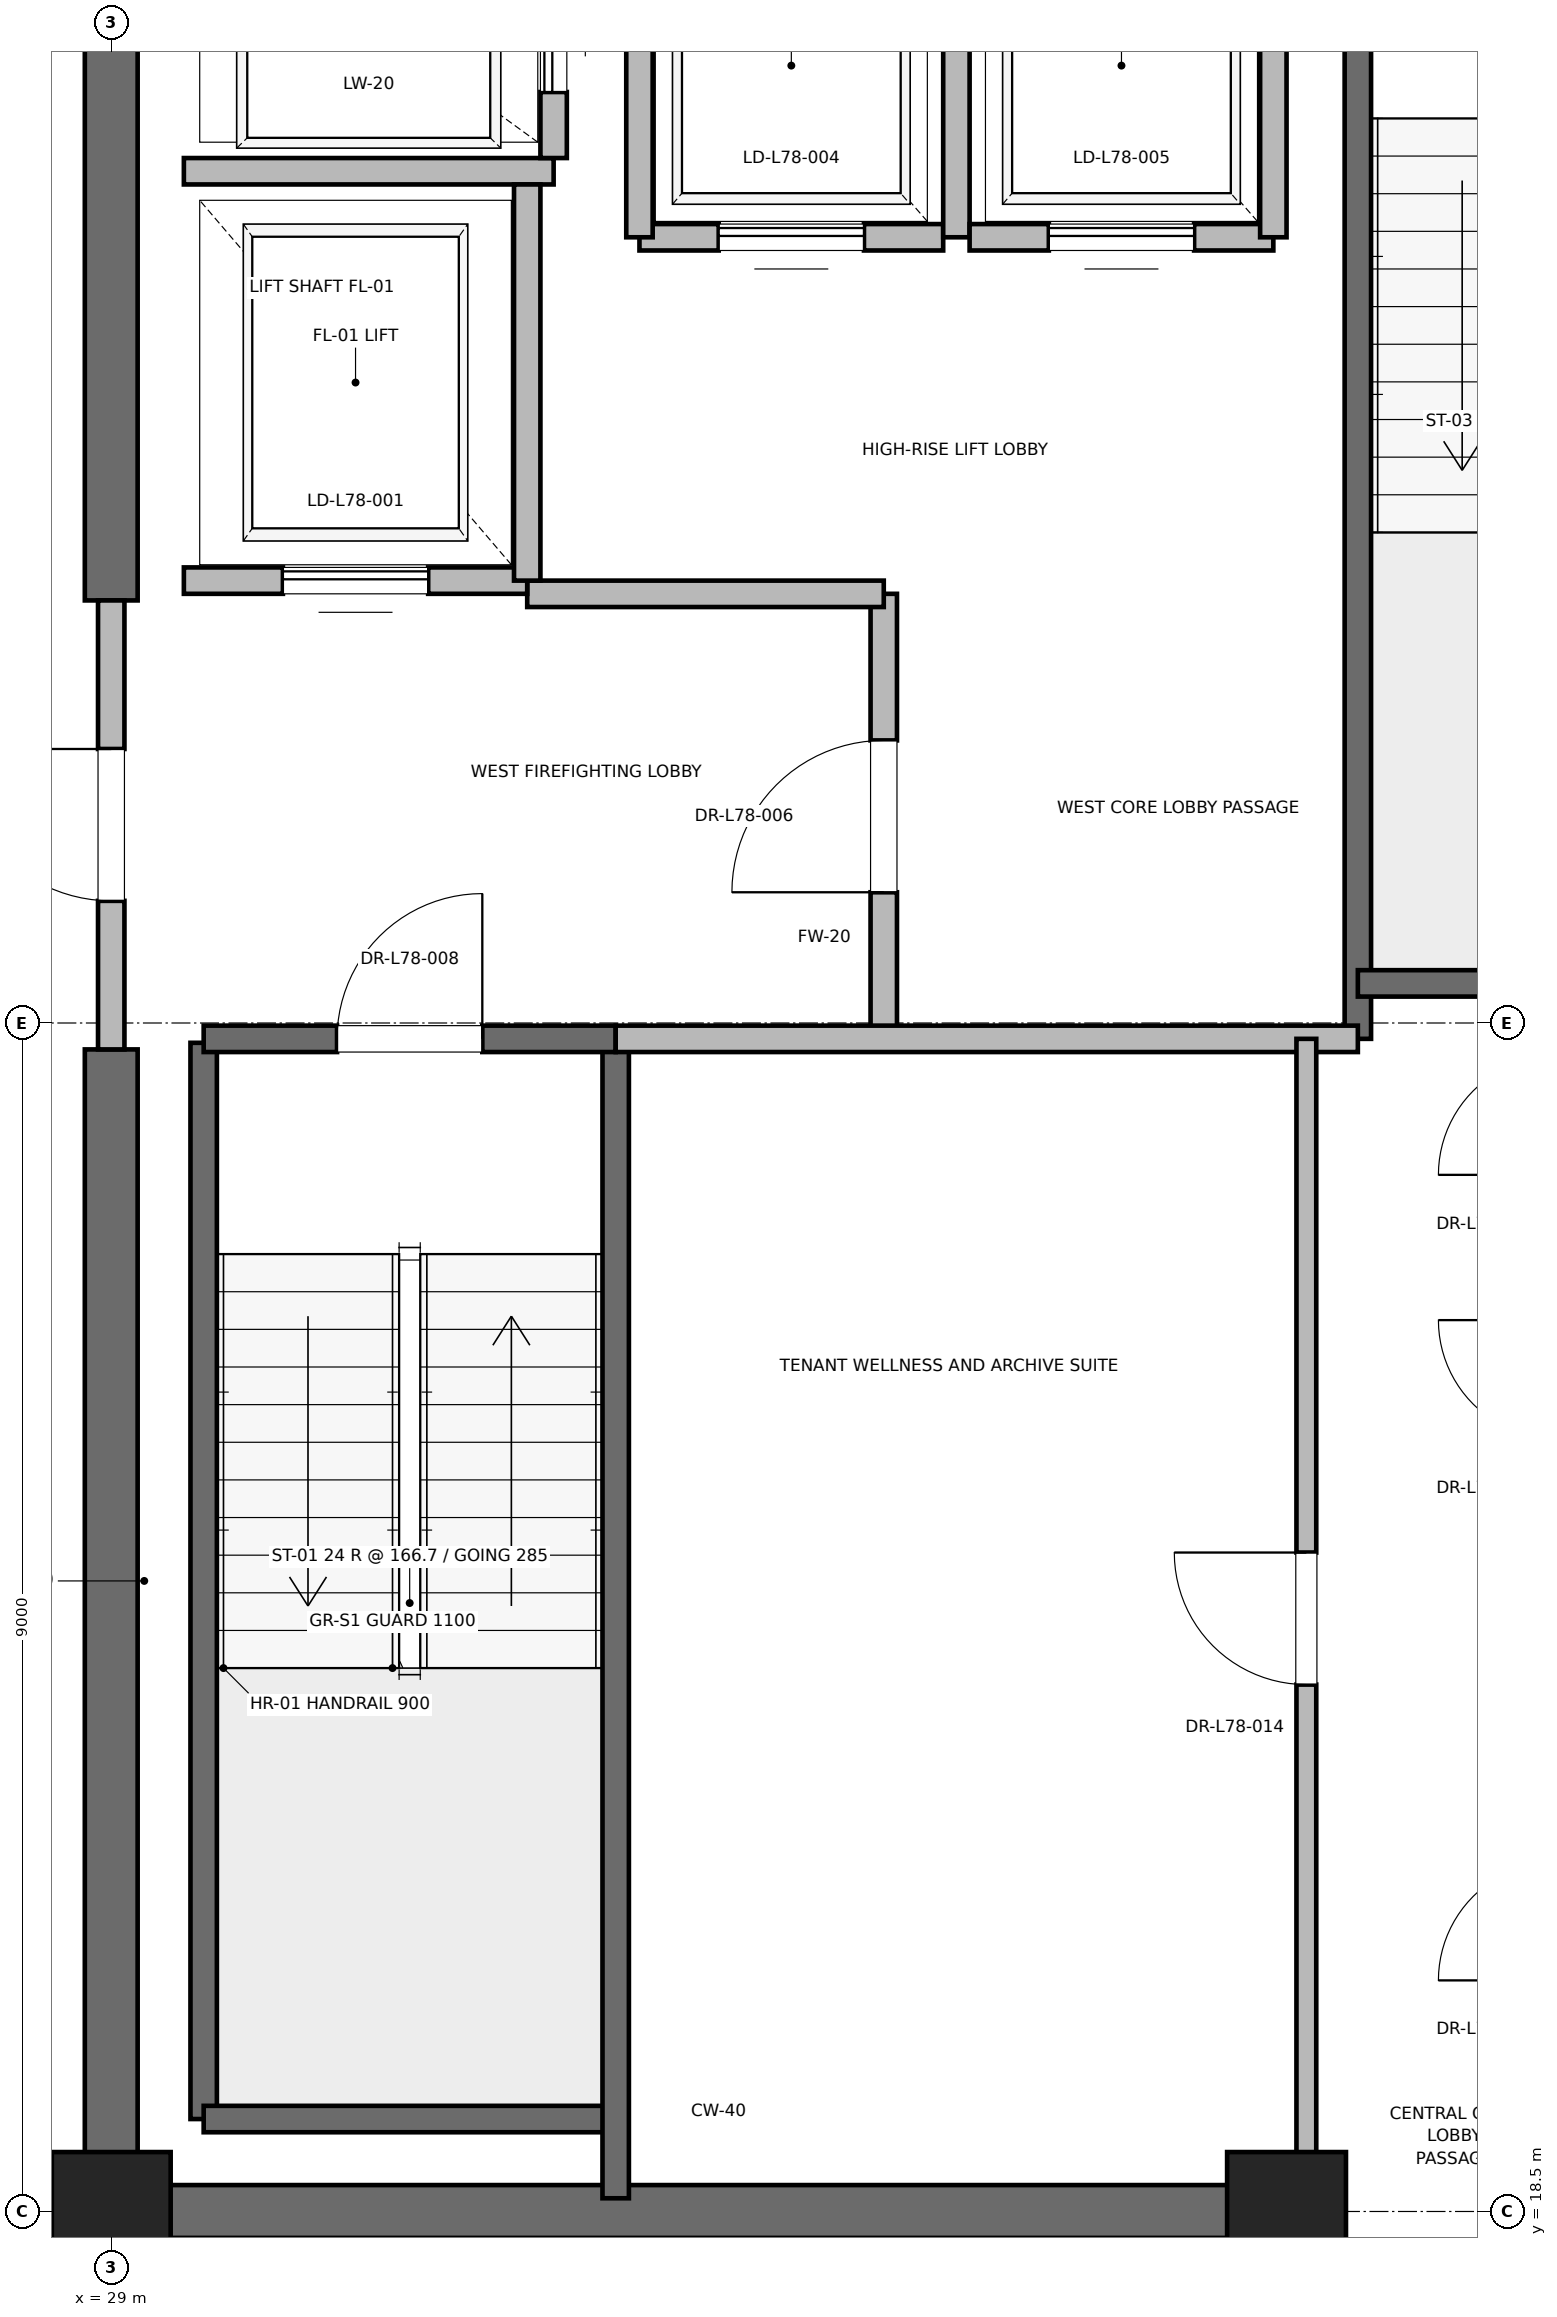
"""IFC4 building model, lengths in metres.
Left out: names, types, materials, properties, quantities, classifications, styles, units other than length and angle.
Written with IfcOpenShell. Run it as: python <this file> out.ifc"""

import sys

from ifc_helpers import new_model, si_unit, direction, frame, frame_2d, origin, origin_2d, place, context, subcontext, project, spatial, rectangle, extrude, element, fill, save


model = new_model("IFC4")
c1 = context("Model", 3, precision=1e-05, world=origin(), true_north=direction((0.0, 1.0)))
c2 = subcontext(c1, "Body", "Model", "MODEL_VIEW")
j1 = project(units=[si_unit("LENGTHUNIT", "METRE"), si_unit("PLANEANGLEUNIT", "RADIAN")], contexts=[c1])
p1 = place(None, origin())
s1 = spatial("IfcSite", under=j1, at=p1, CompositionType="ELEMENT")
p2 = place(p1, origin())
s2 = spatial("IfcBuilding", under=s1, at=p2, CompositionType="ELEMENT")
p3 = place(p2, frame((0.0, 0.0, 334.8)))
s3 = spatial("IfcBuildingStorey", under=s2, at=p3, CompositionType="ELEMENT", Elevation=334.8)
for number, where, z_axis, x_axis in (
    (1, (29.0, 18.5, 0.0), (0.0, 0.0, 1.0), (1.0, 0.0, 0.0)),
    (2, (37.9, 18.5, 0.0), (0.0, 0.0, 1.0), (1.0, 0.0, 0.0)),
):
    element("IfcColumn", number, at=place(p3, frame(where, z_axis=z_axis, x_axis=x_axis)), inside=s3, PredefinedType="PILASTER", context=c2, shape_type="SweptSolid", body=[
        extrude(rectangle(XDim=0.9, YDim=0.9, at=origin_2d()), origin(), (0.0, 0.0, 1.0), 4.0),
    ])
p4 = place(p3, frame((29.0, 18.5, 0.0), z_axis=(0.0, 0.0, 1.0), x_axis=(1.0, 0.0, 0.0)))
e3 = element("IfcWall", 3, at=p4, inside=s3, PredefinedType="SHEAR", context=c2, shape_type="SweptSolid", body=[
    extrude(rectangle(XDim=9.2, YDim=0.4, at=frame_2d((4.6, 0.0))), origin(), (0.0, 0.0, 1.0), 3.785),
])
p5 = place(p3, frame((29.0, 18.5, 0.0), z_axis=(0.0, 0.0, 1.0), x_axis=(0.0, 1.0, 0.0)))
e4 = element("IfcWall", 4, at=p5, inside=s3, PredefinedType="SHEAR", context=c2, shape_type="SweptSolid", body=[
    extrude(rectangle(XDim=8.8, YDim=0.4, at=frame_2d((4.4, 0.0))), origin(), (0.0, 0.0, 1.0), 3.785),
])
p6 = place(p3, frame((29.0, 30.7, 0.0), z_axis=(0.0, 0.0, 1.0), x_axis=(0.0, 1.0, 0.0)))
e5 = element("IfcWall", 5, at=p6, inside=s3, PredefinedType="SHEAR", context=c2, shape_type="SweptSolid", body=[
    extrude(rectangle(XDim=5.8, YDim=0.4, at=frame_2d((2.9, 0.0))), origin(), (0.0, 0.0, 1.0), 3.785),
])
p7 = place(p3, frame((29.7, 19.2, 0.0), z_axis=(0.0, 0.0, 1.0), x_axis=(0.0, 1.0, 0.0)))
e6 = element("IfcWall", 6, at=p7, inside=s3, PredefinedType="SOLIDWALL", context=c2, shape_type="SweptSolid", body=[
    extrude(rectangle(XDim=8.15, YDim=0.2, at=frame_2d((4.075, 0.0))), origin(), (0.0, 0.0, 1.0), 3.785),
])
p8 = place(p3, frame((29.7, 19.2, 0.0), z_axis=(0.0, 0.0, 1.0), x_axis=(1.0, 0.0, 0.0)))
e7 = element("IfcWall", 7, at=p8, inside=s3, PredefinedType="SOLIDWALL", context=c2, shape_type="SweptSolid", body=[
    extrude(rectangle(XDim=3.12, YDim=0.2, at=frame_2d((1.56, 0.0))), origin(), (0.0, 0.0, 1.0), 3.785),
])
p9 = place(p3, frame((32.82, 18.6, 0.0), z_axis=(0.0, 0.0, 1.0), x_axis=(0.0, 1.0, 0.0)))
e8 = element("IfcWall", 8, at=p9, inside=s3, PredefinedType="SOLIDWALL", context=c2, shape_type="SweptSolid", body=[
    extrude(rectangle(XDim=8.78, YDim=0.2, at=frame_2d((4.39, 0.0))), origin(), (0.0, 0.0, 1.0), 3.785),
])
p10 = place(p3, frame((29.7, 27.38, 0.0), z_axis=(0.0, 0.0, 1.0), x_axis=(1.0, 0.0, 0.0)))
e9 = element("IfcWall", 9, at=p10, inside=s3, PredefinedType="SOLIDWALL", context=c2, shape_type="SweptSolid", body=[
    extrude(rectangle(XDim=3.12, YDim=0.2, at=frame_2d((1.56, 0.0))), origin(), (0.0, 0.0, 1.0), 3.785),
])
p11 = place(p10, frame((1.01, 0.0, 0.0)))
e10 = element("IfcOpeningElement", 10, at=p11, cuts=e9, PredefinedType="OPENING", context=c2, shape_type="SweptSolid", body=[
    extrude(rectangle(XDim=1.1, YDim=2.15, at=frame_2d((0.55, 1.075))), frame((0.0, 0.1, 0.0), z_axis=(0.0, -1.0, 0.0), x_axis=(1.0, 0.0, 0.0)), (0.0, 0.0, 1.0), 0.2),
])
p12 = place(p3, frame((38.44, 27.38, 0.0), z_axis=(0.0, 0.0, 1.0), x_axis=(0.0, 1.0, 0.0)))
e11 = element("IfcWall", 11, at=p12, inside=s3, PredefinedType="SOLIDWALL", context=c2, shape_type="SweptSolid", body=[
    extrude(rectangle(XDim=8.87, YDim=0.2, at=frame_2d((4.435, 0.0))), origin(), (0.0, 0.0, 1.0), 3.785),
])
p13 = place(p3, frame((38.44, 27.8, 0.0), z_axis=(0.0, 0.0, 1.0), x_axis=(1.0, 0.0, 0.0)))
e12 = element("IfcWall", 12, at=p13, inside=s3, PredefinedType="SOLIDWALL", context=c2, shape_type="SweptSolid", body=[
    extrude(rectangle(XDim=3.32, YDim=0.2, at=frame_2d((1.66, 0.0))), origin(), (0.0, 0.0, 1.0), 3.785),
])
p14 = place(p3, frame((34.85, 27.38, 0.0), z_axis=(0.0, 0.0, 1.0), x_axis=(0.0, 1.0, 0.0)))
e13 = element("IfcWall", 13, at=p14, inside=s3, PredefinedType="PARTITIONING", context=c2, shape_type="SweptSolid", body=[
    extrude(rectangle(XDim=3.37, YDim=0.2, at=frame_2d((1.685, 0.0))), origin(), (0.0, 0.0, 1.0), 3.785),
])
p15 = place(p14, frame((1.11, 0.0, 0.0)))
e14 = element("IfcOpeningElement", 14, at=p15, cuts=e13, PredefinedType="OPENING", context=c2, shape_type="SweptSolid", body=[
    extrude(rectangle(XDim=1.15, YDim=2.2, at=frame_2d((0.575, 1.1))), frame((0.0, 0.1, 0.0), z_axis=(0.0, -1.0, 0.0), x_axis=(1.0, 0.0, 0.0)), (0.0, 0.0, 1.0), 0.2),
])
p16 = place(p3, frame((29.0, 27.3, 0.0), z_axis=(0.0, 0.0, 1.0), x_axis=(0.0, 1.0, 0.0)))
e15 = element("IfcWall", 15, at=p16, inside=s3, PredefinedType="PARTITIONING", context=c2, shape_type="SweptSolid", body=[
    extrude(rectangle(XDim=3.4, YDim=0.2, at=frame_2d((1.7, 0.0))), origin(), (0.0, 0.0, 1.0), 2.865),
])
p17 = place(p16, frame((1.125, 0.0, 0.0)))
e16 = element("IfcOpeningElement", 16, at=p17, cuts=e15, PredefinedType="OPENING", context=c2, shape_type="SweptSolid", body=[
    extrude(rectangle(XDim=1.15, YDim=2.2, at=frame_2d((0.575, 1.1))), frame((0.0, 0.1, 0.0), z_axis=(0.0, -1.0, 0.0), x_axis=(1.0, 0.0, 0.0)), (0.0, 0.0, 1.0), 0.2),
])
p18 = place(p3, frame((32.82, 27.38, 0.0), z_axis=(0.0, 0.0, 1.0), x_axis=(1.0, 0.0, 0.0)))
e17 = element("IfcWall", 17, at=p18, inside=s3, PredefinedType="PARTITIONING", context=c2, shape_type="SweptSolid", body=[
    extrude(rectangle(XDim=5.62, YDim=0.2, at=frame_2d((2.81, 0.0))), origin(), (0.0, 0.0, 1.0), 3.785),
])
p19 = place(p3, frame((32.15, 30.75, 0.0), z_axis=(0.0, 0.0, 1.0), x_axis=(1.0, 0.0, 0.0)))
e18 = element("IfcWall", 18, at=p19, inside=s3, PredefinedType="PARTITIONING", context=c2, shape_type="SweptSolid", body=[
    extrude(rectangle(XDim=2.7, YDim=0.2, at=frame_2d((1.35, 0.0))), origin(), (0.0, 0.0, 1.0), 3.785),
])
p20 = place(p3, frame((29.55, 30.85, 0.0), z_axis=(0.0, 0.0, 1.0), x_axis=(1.0, 0.0, 0.0)))
e19 = element("IfcWall", 19, at=p20, inside=s3, PredefinedType="SOLIDWALL", context=c2, shape_type="SweptSolid", body=[
    extrude(rectangle(XDim=2.6, YDim=0.2, at=frame_2d((1.3, 0.0))), origin(), (0.0, 0.0, 1.0), 2.865),
])
p21 = place(p20, frame((0.75, 0.0, 0.0)))
e20 = element("IfcOpeningElement", 20, at=p21, cuts=e19, PredefinedType="OPENING", context=c2, shape_type="SweptSolid", body=[
    extrude(rectangle(XDim=1.1, YDim=2.2, at=frame_2d((0.55, 1.1))), frame((0.0, 0.1, 0.0), z_axis=(0.0, -1.0, 0.0), x_axis=(1.0, 0.0, 0.0)), (0.0, 0.0, 1.0), 0.2),
])
p22 = place(p3, frame((29.55, 33.95, 0.0), z_axis=(0.0, 0.0, 1.0), x_axis=(1.0, 0.0, 0.0)))
e21 = element("IfcWall", 21, at=p22, inside=s3, PredefinedType="SOLIDWALL", context=c2, shape_type="SweptSolid", body=[
    extrude(rectangle(XDim=2.8, YDim=0.2, at=frame_2d((1.4, 0.0))), origin(), (0.0, 0.0, 1.0), 3.785),
])
p23 = place(p3, frame((32.15, 30.85, 0.0), z_axis=(0.0, 0.0, 1.0), x_axis=(0.0, 1.0, 0.0)))
e22 = element("IfcWall", 22, at=p23, inside=s3, PredefinedType="SOLIDWALL", context=c2, shape_type="SweptSolid", body=[
    extrude(rectangle(XDim=3.0, YDim=0.2, at=frame_2d((1.5, 0.0))), origin(), (0.0, 0.0, 1.0), 3.785),
])
p24 = place(p3, frame((32.35, 34.05, 0.0), z_axis=(0.0, 0.0, 1.0), x_axis=(0.0, 1.0, 0.0)))
e23 = element("IfcWall", 23, at=p24, inside=s3, PredefinedType="SOLIDWALL", context=c2, shape_type="SweptSolid", body=[
    extrude(rectangle(XDim=2.1, YDim=0.2, at=frame_2d((1.05, 0.0))), origin(), (0.0, 0.0, 1.0), 3.785),
])
p25 = place(p24, frame((0.5, 0.0, 0.0)))
e24 = element("IfcOpeningElement", 24, at=p25, cuts=e23, PredefinedType="OPENING", context=c2, shape_type="SweptSolid", body=[
    extrude(rectangle(XDim=1.1, YDim=2.2, at=frame_2d((0.55, 1.1))), frame((0.0, 0.1, 0.0), z_axis=(0.0, -1.0, 0.0), x_axis=(1.0, 0.0, 0.0)), (0.0, 0.0, 1.0), 0.2),
])
p26 = place(p3, frame((33.0, 33.45, 0.0), z_axis=(0.0, 0.0, 1.0), x_axis=(1.0, 0.0, 0.0)))
e25 = element("IfcWall", 25, at=p26, inside=s3, PredefinedType="SOLIDWALL", context=c2, shape_type="SweptSolid", body=[
    extrude(rectangle(XDim=2.3, YDim=0.2, at=frame_2d((1.15, 0.0))), origin(), (0.0, 0.0, 1.0), 3.785),
])
p27 = place(p26, frame((0.6, 0.0, 0.0)))
e26 = element("IfcOpeningElement", 26, at=p27, cuts=e25, PredefinedType="OPENING", context=c2, shape_type="SweptSolid", body=[
    extrude(rectangle(XDim=1.1, YDim=2.2, at=frame_2d((0.55, 1.1))), frame((0.0, 0.1, 0.0), z_axis=(0.0, -1.0, 0.0), x_axis=(1.0, 0.0, 0.0)), (0.0, 0.0, 1.0), 0.2),
])
p28 = place(p3, frame((33.0, 36.05, 0.0), z_axis=(0.0, 0.0, 1.0), x_axis=(0.0, -1.0, 0.0)))
e27 = element("IfcWall", 27, at=p28, inside=s3, PredefinedType="SOLIDWALL", context=c2, shape_type="SweptSolid", body=[
    extrude(rectangle(XDim=2.6, YDim=0.2, at=frame_2d((1.3, 0.0))), origin(), (0.0, 0.0, 1.0), 3.785),
])
p29 = place(p3, frame((35.4, 33.45, 0.0), z_axis=(0.0, 0.0, 1.0), x_axis=(0.0, 1.0, 0.0)))
e28 = element("IfcWall", 28, at=p29, inside=s3, PredefinedType="SOLIDWALL", context=c2, shape_type="SweptSolid", body=[
    extrude(rectangle(XDim=2.6, YDim=0.2, at=frame_2d((1.3, 0.0))), origin(), (0.0, 0.0, 1.0), 2.865),
])
p30 = place(p3, frame((35.5, 33.45, 0.0), z_axis=(0.0, 0.0, 1.0), x_axis=(1.0, 0.0, 0.0)))
e29 = element("IfcWall", 29, at=p30, inside=s3, PredefinedType="SOLIDWALL", context=c2, shape_type="SweptSolid", body=[
    extrude(rectangle(XDim=2.3, YDim=0.2, at=frame_2d((1.15, 0.0))), origin(), (0.0, 0.0, 1.0), 3.785),
])
p31 = place(p30, frame((0.6, 0.0, 0.0)))
e30 = element("IfcOpeningElement", 30, at=p31, cuts=e29, PredefinedType="OPENING", context=c2, shape_type="SweptSolid", body=[
    extrude(rectangle(XDim=1.1, YDim=2.2, at=frame_2d((0.55, 1.1))), frame((0.0, 0.1, 0.0), z_axis=(0.0, -1.0, 0.0), x_axis=(1.0, 0.0, 0.0)), (0.0, 0.0, 1.0), 0.2),
])
p32 = place(p3, frame((37.8, 33.45, 0.0), z_axis=(0.0, 0.0, 1.0), x_axis=(0.0, 1.0, 0.0)))
e31 = element("IfcWall", 31, at=p32, inside=s3, PredefinedType="SOLIDWALL", context=c2, shape_type="SweptSolid", body=[
    extrude(rectangle(XDim=2.6, YDim=0.2, at=frame_2d((1.3, 0.0))), origin(), (0.0, 0.0, 1.0), 2.865),
])
p33 = place(p3, frame((38.05, 18.6, 0.0), z_axis=(0.0, 0.0, 1.0), x_axis=(0.0, 1.0, 0.0)))
e32 = element("IfcWall", 32, at=p33, inside=s3, PredefinedType="PARTITIONING", context=c2, shape_type="SweptSolid", body=[
    extrude(rectangle(XDim=8.78, YDim=0.15, at=frame_2d((4.39, 0.0))), origin(), (0.0, 0.0, 1.0), 2.85),
])
p34 = place(p33, frame((3.89, 0.0, 0.0)))
e33 = element("IfcOpeningElement", 33, at=p34, cuts=e32, PredefinedType="OPENING", context=c2, shape_type="SweptSolid", body=[
    extrude(rectangle(XDim=1.0, YDim=2.15, at=frame_2d((0.5, 1.075))), frame((0.0, 0.075, 0.0), z_axis=(0.0, -1.0, 0.0), x_axis=(1.0, 0.0, 0.0)), (0.0, 0.0, 1.0), 0.15),
])
p35 = place(p11, origin())
e34 = element("IfcDoor", 34, at=p35, inside=s3, OperationType="SINGLE_SWING_RIGHT", PredefinedType="DOOR", context=c2, shape_type="SweptSolid", body=[
    extrude(rectangle(XDim=1.1, YDim=2.15, at=frame_2d((0.55, 1.075))), frame((0.0, 0.025, 0.0), z_axis=(0.0, -1.0, 0.0), x_axis=(1.0, 0.0, 0.0)), (0.0, 0.0, 1.0), 0.05),
])
fill(e10, e34)
p36 = place(p15, origin())
e35 = element("IfcDoor", 35, at=p36, inside=s3, OperationType="SINGLE_SWING_LEFT", PredefinedType="DOOR", context=c2, shape_type="SweptSolid", body=[
    extrude(rectangle(XDim=1.15, YDim=2.2, at=frame_2d((0.575, 1.1))), frame((0.0, 0.025, 0.0), z_axis=(0.0, -1.0, 0.0), x_axis=(1.0, 0.0, 0.0)), (0.0, 0.0, 1.0), 0.05),
])
fill(e14, e35)
p37 = place(p17, origin())
e36 = element("IfcDoor", 36, at=p37, inside=s3, OperationType="SINGLE_SWING_RIGHT", PredefinedType="DOOR", context=c2, shape_type="SweptSolid", body=[
    extrude(rectangle(XDim=1.15, YDim=2.2, at=frame_2d((0.575, 1.1))), frame((0.0, 0.025, 0.0), z_axis=(0.0, -1.0, 0.0), x_axis=(1.0, 0.0, 0.0)), (0.0, 0.0, 1.0), 0.05),
])
fill(e16, e36)
p38 = place(p21, origin())
e37 = element("IfcDoor", 37, at=p38, inside=s3, OperationType="SLIDING_TO_RIGHT", PredefinedType="DOOR", context=c2, shape_type="SweptSolid", body=[
    extrude(rectangle(XDim=1.1, YDim=2.2, at=frame_2d((0.55, 1.1))), frame((0.0, 0.025, 0.0), z_axis=(0.0, -1.0, 0.0), x_axis=(1.0, 0.0, 0.0)), (0.0, 0.0, 1.0), 0.05),
])
fill(e20, e37)
p39 = place(p25, origin())
e38 = element("IfcDoor", 38, at=p39, inside=s3, OperationType="SLIDING_TO_RIGHT", PredefinedType="DOOR", context=c2, shape_type="SweptSolid", body=[
    extrude(rectangle(XDim=1.1, YDim=2.2, at=frame_2d((0.55, 1.1))), frame((0.0, 0.025, 0.0), z_axis=(0.0, -1.0, 0.0), x_axis=(1.0, 0.0, 0.0)), (0.0, 0.0, 1.0), 0.05),
])
fill(e24, e38)
p40 = place(p27, origin())
e39 = element("IfcDoor", 39, at=p40, inside=s3, OperationType="SLIDING_TO_RIGHT", PredefinedType="DOOR", context=c2, shape_type="SweptSolid", body=[
    extrude(rectangle(XDim=1.1, YDim=2.2, at=frame_2d((0.55, 1.1))), frame((0.0, 0.025, 0.0), z_axis=(0.0, -1.0, 0.0), x_axis=(1.0, 0.0, 0.0)), (0.0, 0.0, 1.0), 0.05),
])
fill(e26, e39)
p41 = place(p31, origin())
e40 = element("IfcDoor", 40, at=p41, inside=s3, OperationType="SLIDING_TO_RIGHT", PredefinedType="DOOR", context=c2, shape_type="SweptSolid", body=[
    extrude(rectangle(XDim=1.1, YDim=2.2, at=frame_2d((0.55, 1.1))), frame((0.0, 0.025, 0.0), z_axis=(0.0, -1.0, 0.0), x_axis=(1.0, 0.0, 0.0)), (0.0, 0.0, 1.0), 0.05),
])
fill(e30, e40)
p42 = place(p34, origin())
e41 = element("IfcDoor", 41, at=p42, inside=s3, OperationType="SINGLE_SWING_RIGHT", PredefinedType="DOOR", context=c2, shape_type="SweptSolid", body=[
    extrude(rectangle(XDim=1.0, YDim=2.15, at=frame_2d((0.5, 1.075))), frame((0.0, 0.025, 0.0), z_axis=(0.0, -1.0, 0.0), x_axis=(1.0, 0.0, 0.0)), (0.0, 0.0, 1.0), 0.05),
])
fill(e33, e41)
save(model, sys.argv[1])
